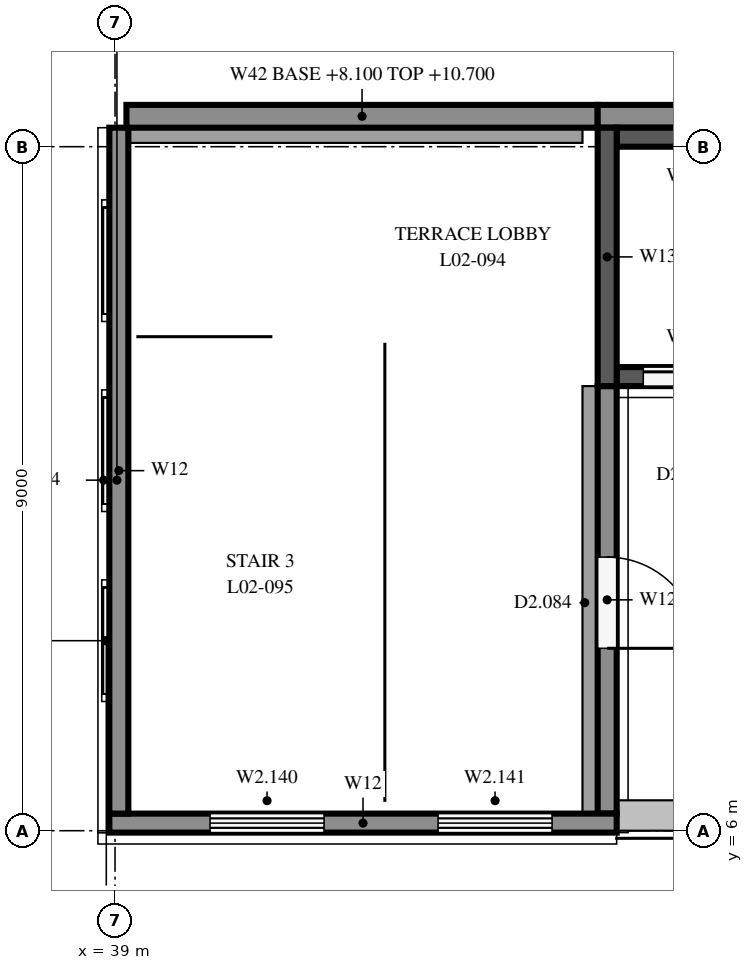
"""IFC4 building model, lengths in metres.
Left out: names, types, materials, properties, quantities, classifications, styles, units other than length and angle.
Written with IfcOpenShell. Run it as: python <this file> out.ifc"""

import sys

from ifc_helpers import new_model, si_unit, direction, frame, frame_2d, origin, place, context, subcontext, project, spatial, rectangle, extrude, element, fill, save


model = new_model("IFC4")
c1 = context("Model", 3, precision=1e-05, world=origin(), true_north=direction((0.0, 1.0)))
c2 = subcontext(c1, "Body", "Model", "MODEL_VIEW")
j1 = project(units=[si_unit("LENGTHUNIT", "METRE"), si_unit("PLANEANGLEUNIT", "RADIAN")], contexts=[c1])
p1 = place(None, origin())
s1 = spatial("IfcSite", under=j1, at=p1, CompositionType="ELEMENT")
p2 = place(p1, origin())
s2 = spatial("IfcBuilding", under=s1, at=p2, CompositionType="ELEMENT")
p3 = place(p2, frame((0.0, 0.0, 8.1)))
s3 = spatial("IfcBuildingStorey", under=s2, at=p3, CompositionType="ELEMENT", Elevation=8.1)
p4 = place(p3, frame((45.35, 15.4, 0.0), z_axis=(0.0, 0.0, 1.0), x_axis=(-1.0, 0.0, 0.0)))
e1 = element("IfcWall", 1, at=p4, inside=s3, PredefinedType="SOLIDWALL", context=c2, shape_type="SweptSolid", body=[
    extrude(rectangle(XDim=6.2, YDim=0.3, at=frame_2d((3.1, 0.0))), origin(), (0.0, 0.0, 1.0), 2.6),
])
p5 = place(p3, frame((51.0, 15.4, 0.0), z_axis=(0.0, 0.0, 1.0), x_axis=(-1.0, 0.0, 0.0)))
e2 = element("IfcWall", 2, at=p5, inside=s3, PredefinedType="SOLIDWALL", context=c2, shape_type="SweptSolid", body=[
    extrude(rectangle(XDim=5.65, YDim=0.3, at=frame_2d((2.825, 0.0))), origin(), (0.0, 0.0, 1.0), 1.1),
])
p6 = place(p3, frame((45.6, 6.1, 0.0), z_axis=(0.0, 0.0, 1.0), x_axis=(-1.0, 0.0, 0.0)))
e3 = element("IfcWall", 3, at=p6, inside=s3, PredefinedType="SOLIDWALL", context=c2, shape_type="SweptSolid", body=[
    extrude(rectangle(XDim=6.675, YDim=0.25, at=frame_2d((3.337, 0.0))), origin(), (0.0, 0.0, 1.0), 2.6),
])
p7 = place(p6, frame((3.85, 0.0, 1.0)))
e4 = element("IfcOpeningElement", 4, at=p7, cuts=e3, PredefinedType="OPENING", context=c2, shape_type="SweptSolid", body=[
    extrude(rectangle(XDim=1.5, YDim=1.2, at=frame_2d((0.75, 0.6))), frame((0.0, 0.135, 0.0), z_axis=(0.0, -1.0, 0.0), x_axis=(1.0, 0.0, 0.0)), (0.0, 0.0, 1.0), 0.27),
])
p8 = place(p6, frame((0.85, 0.0, 1.0)))
e5 = element("IfcOpeningElement", 5, at=p8, cuts=e3, PredefinedType="OPENING", context=c2, shape_type="SweptSolid", body=[
    extrude(rectangle(XDim=1.5, YDim=1.2, at=frame_2d((0.75, 0.6))), frame((0.0, 0.135, 0.0), z_axis=(0.0, -1.0, 0.0), x_axis=(1.0, 0.0, 0.0)), (0.0, 0.0, 1.0), 0.27),
])
p9 = place(p3, frame((39.05, 6.225, 0.0), z_axis=(0.0, 0.0, 1.0), x_axis=(0.0, 1.0, 0.0)))
e6 = element("IfcWall", 6, at=p9, inside=s3, PredefinedType="SOLIDWALL", context=c2, shape_type="SweptSolid", body=[
    extrude(rectangle(XDim=9.025, YDim=0.25, at=frame_2d((4.512, 0.0))), origin(), (0.0, 0.0, 1.0), 2.6),
])
p10 = place(p3, frame((45.475, 11.85, 0.0), z_axis=(0.0, 0.0, 1.0), x_axis=(0.0, -1.0, 0.0)))
e7 = element("IfcWall", 7, at=p10, inside=s3, PredefinedType="SOLIDWALL", context=c2, shape_type="SweptSolid", body=[
    extrude(rectangle(XDim=5.625, YDim=0.25, at=frame_2d((2.812, 0.0))), origin(), (0.0, 0.0, 1.0), 2.6),
])
p11 = place(p10, frame((2.25, 0.0, 0.0)))
e8 = element("IfcOpeningElement", 8, at=p11, cuts=e7, PredefinedType="OPENING", context=c2, shape_type="SweptSolid", body=[
    extrude(rectangle(XDim=1.2, YDim=2.2, at=frame_2d((0.6, 1.1))), frame((0.0, 0.135, 0.0), z_axis=(0.0, -1.0, 0.0), x_axis=(1.0, 0.0, 0.0)), (0.0, 0.0, 1.0), 0.27),
])
p12 = place(p3, frame((45.475, 11.85, 0.0), z_axis=(0.0, 0.0, 1.0), x_axis=(0.0, 1.0, 0.0)))
e9 = element("IfcWall", 9, at=p12, inside=s3, PredefinedType="SHEAR", context=c2, shape_type="SweptSolid", body=[
    extrude(rectangle(XDim=3.4, YDim=0.25, at=frame_2d((1.7, 0.0))), origin(), (0.0, 0.0, 1.0), 2.85),
])
p13 = place(p3, frame((45.6, 11.975, 0.0), z_axis=(0.0, 0.0, 1.0), x_axis=(1.0, 0.0, 0.0)))
e10 = element("IfcWall", 10, at=p13, inside=s3, PredefinedType="SHEAR", context=c2, shape_type="SweptSolid", body=[
    extrude(rectangle(XDim=1.8, YDim=0.25, at=frame_2d((0.9, 0.0))), origin(), (0.0, 0.0, 1.0), 2.85),
])
p14 = place(p13, frame((0.35, 0.0, 0.0)))
e11 = element("IfcOpeningElement", 11, at=p14, cuts=e10, PredefinedType="OPENING", context=c2, shape_type="SweptSolid", body=[
    extrude(rectangle(XDim=1.1, YDim=2.1, at=frame_2d((0.55, 1.05))), frame((0.0, 0.135, 0.0), z_axis=(0.0, -1.0, 0.0), x_axis=(1.0, 0.0, 0.0)), (0.0, 0.0, 1.0), 0.27),
])
p15 = place(p3, frame((45.6, 15.125, 0.0), z_axis=(0.0, 0.0, 1.0), x_axis=(1.0, 0.0, 0.0)))
e12 = element("IfcWall", 12, at=p15, inside=s3, PredefinedType="SHEAR", context=c2, shape_type="SweptSolid", body=[
    extrude(rectangle(XDim=1.8, YDim=0.25, at=frame_2d((0.9, 0.0))), origin(), (0.0, 0.0, 1.0), 2.85),
])
p16 = place(p11, origin())
e13 = element("IfcDoor", 13, at=p16, inside=s3, OperationType="SINGLE_SWING_RIGHT", PredefinedType="NOTDEFINED", context=c2, shape_type="SweptSolid", body=[
    extrude(rectangle(XDim=1.2, YDim=2.2, at=frame_2d((0.6, 1.1))), frame((0.0, 0.025, 0.0), z_axis=(0.0, -1.0, 0.0), x_axis=(1.0, 0.0, 0.0)), (0.0, 0.0, 1.0), 0.05),
])
fill(e8, e13)
p17 = place(p7, origin())
e14 = element("IfcWindow", 14, at=p17, inside=s3, PartitioningType="SINGLE_PANEL", PredefinedType="WINDOW", context=c2, shape_type="SweptSolid", body=[
    extrude(rectangle(XDim=1.5, YDim=1.2, at=frame_2d((0.75, 0.6))), frame((0.0, 0.03, 0.0), z_axis=(0.0, -1.0, 0.0), x_axis=(1.0, 0.0, 0.0)), (0.0, 0.0, 1.0), 0.06),
])
fill(e4, e14)
p18 = place(p8, origin())
e15 = element("IfcWindow", 15, at=p18, inside=s3, PartitioningType="SINGLE_PANEL", PredefinedType="WINDOW", context=c2, shape_type="SweptSolid", body=[
    extrude(rectangle(XDim=1.5, YDim=1.2, at=frame_2d((0.75, 0.6))), frame((0.0, 0.03, 0.0), z_axis=(0.0, -1.0, 0.0), x_axis=(1.0, 0.0, 0.0)), (0.0, 0.0, 1.0), 0.06),
])
fill(e5, e15)
p19 = place(p14, origin())
e16 = element("IfcDoor", 16, at=p19, inside=s3, OperationType="SLIDING_TO_LEFT", PredefinedType="NOTDEFINED", context=c2, shape_type="SweptSolid", body=[
    extrude(rectangle(XDim=1.1, YDim=2.1, at=frame_2d((0.55, 1.05))), frame((0.0, 0.025, 0.0), z_axis=(0.0, -1.0, 0.0), x_axis=(1.0, 0.0, 0.0)), (0.0, 0.0, 1.0), 0.05),
])
fill(e11, e16)
save(model, sys.argv[1])
